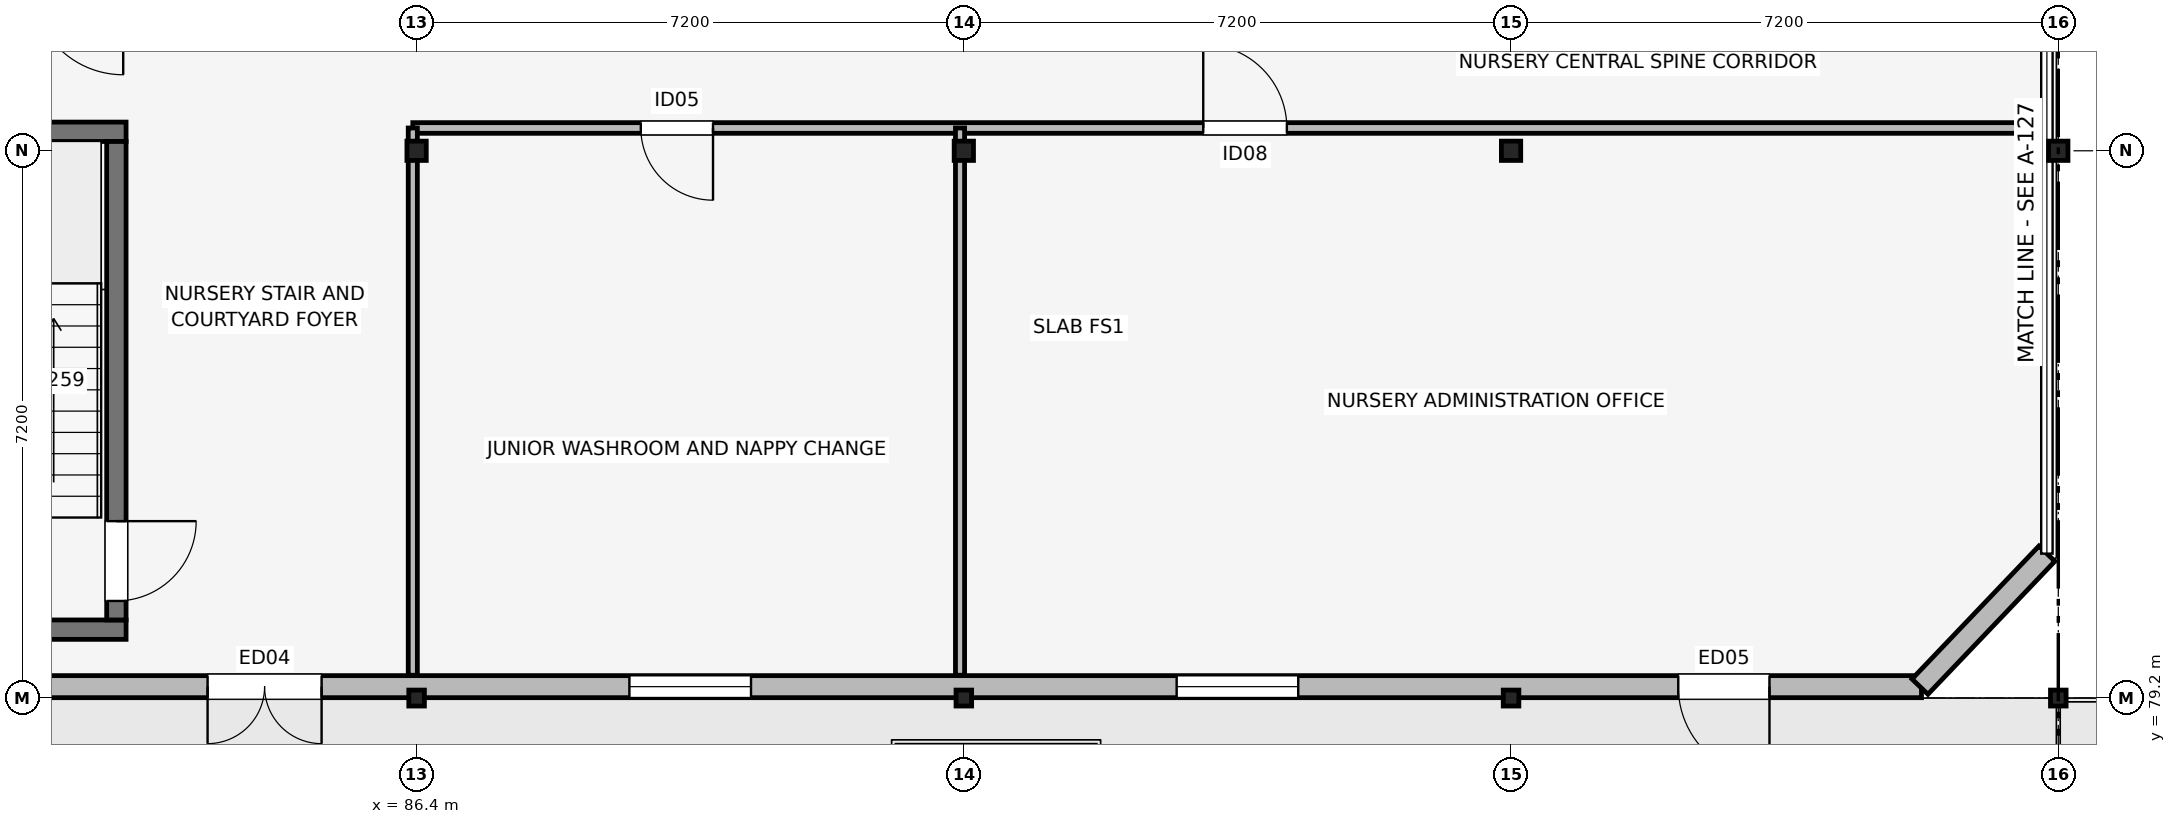
"""IFC4 building model, lengths in metres.
Left out: names, types, materials, properties, quantities, classifications, styles, units other than length and angle.
Written with IfcOpenShell. Run it as: python <this file> out.ifc"""

import sys

from ifc_helpers import new_model, si_unit, direction, frame, frame_2d, origin, origin_2d, place, context, subcontext, project, spatial, rectangle, i_section, extrude, element, fill, save


model = new_model("IFC4")
c1 = context("Model", 3, precision=1e-05, world=origin(), true_north=direction((0.0, 1.0)))
c2 = subcontext(c1, "Body", "Model", "MODEL_VIEW")
j1 = project(units=[si_unit("LENGTHUNIT", "METRE"), si_unit("PLANEANGLEUNIT", "RADIAN")], contexts=[c1])
p1 = place(None, origin())
s1 = spatial("IfcSite", under=j1, at=p1, CompositionType="ELEMENT")
p2 = place(p1, origin())
s2 = spatial("IfcBuilding", under=s1, at=p2, CompositionType="ELEMENT")
p3 = place(p2, frame((0.0, 0.0, 4.5)))
s3 = spatial("IfcBuildingStorey", under=s2, at=p3, CompositionType="ELEMENT", Elevation=4.5)
p4 = place(p3, frame((86.4, 79.2, 0.0), z_axis=(0.0, 0.0, 1.0), x_axis=(1.0, 0.0, 0.0)))
e1 = element("IfcColumn", 1, at=p4, inside=s3, PredefinedType="COLUMN", context=c2, shape_type="SweptSolid", body=[
    extrude(i_section(OverallWidth=0.205, OverallDepth=0.21, WebThickness=0.009, FlangeThickness=0.014, FilletRadius=0.01, at=origin_2d()), origin(), (0.0, 0.0, 1.0), 4.2),
])
p5 = place(p3, frame((86.4, 86.4, 0.0), z_axis=(0.0, 0.0, 1.0), x_axis=(1.0, 0.0, 0.0)))
e2 = element("IfcColumn", 2, at=p5, inside=s3, PredefinedType="COLUMN", context=c2, shape_type="SweptSolid", body=[
    extrude(i_section(OverallWidth=0.254, OverallDepth=0.254, WebThickness=0.009, FlangeThickness=0.014, FilletRadius=0.013, at=origin_2d()), origin(), (0.0, 0.0, 1.0), 4.2),
])
p6 = place(p3, frame((93.6, 79.2, 0.0), z_axis=(0.0, 0.0, 1.0), x_axis=(1.0, 0.0, 0.0)))
e3 = element("IfcColumn", 3, at=p6, inside=s3, PredefinedType="COLUMN", context=c2, shape_type="SweptSolid", body=[
    extrude(i_section(OverallWidth=0.205, OverallDepth=0.21, WebThickness=0.009, FlangeThickness=0.014, FilletRadius=0.01, at=origin_2d()), origin(), (0.0, 0.0, 1.0), 4.2),
])
p7 = place(p3, frame((93.6, 86.4, 0.0), z_axis=(0.0, 0.0, 1.0), x_axis=(1.0, 0.0, 0.0)))
e4 = element("IfcColumn", 4, at=p7, inside=s3, PredefinedType="COLUMN", context=c2, shape_type="SweptSolid", body=[
    extrude(i_section(OverallWidth=0.254, OverallDepth=0.254, WebThickness=0.009, FlangeThickness=0.014, FilletRadius=0.013, at=origin_2d()), origin(), (0.0, 0.0, 1.0), 4.2),
])
p8 = place(p3, frame((100.8, 79.2, 0.0), z_axis=(0.0, 0.0, 1.0), x_axis=(1.0, 0.0, 0.0)))
e5 = element("IfcColumn", 5, at=p8, inside=s3, PredefinedType="COLUMN", context=c2, shape_type="SweptSolid", body=[
    extrude(i_section(OverallWidth=0.205, OverallDepth=0.21, WebThickness=0.009, FlangeThickness=0.014, FilletRadius=0.01, at=origin_2d()), origin(), (0.0, 0.0, 1.0), 4.2),
])
p9 = place(p3, frame((100.8, 86.4, 0.0), z_axis=(0.0, 0.0, 1.0), x_axis=(1.0, 0.0, 0.0)))
e6 = element("IfcColumn", 6, at=p9, inside=s3, PredefinedType="COLUMN", context=c2, shape_type="SweptSolid", body=[
    extrude(i_section(OverallWidth=0.254, OverallDepth=0.254, WebThickness=0.009, FlangeThickness=0.014, FilletRadius=0.013, at=origin_2d()), origin(), (0.0, 0.0, 1.0), 4.2),
])
p10 = place(p3, frame((108.0, 79.2, 0.0), z_axis=(0.0, 0.0, 1.0), x_axis=(1.0, 0.0, 0.0)))
e7 = element("IfcColumn", 7, at=p10, inside=s3, PredefinedType="COLUMN", context=c2, shape_type="SweptSolid", body=[
    extrude(i_section(OverallWidth=0.205, OverallDepth=0.21, WebThickness=0.009, FlangeThickness=0.014, FilletRadius=0.01, at=origin_2d()), origin(), (0.0, 0.0, 1.0), 4.2),
])
p11 = place(p3, frame((108.0, 86.4, 0.0), z_axis=(0.0, 0.0, 1.0), x_axis=(1.0, 0.0, 0.0)))
e8 = element("IfcColumn", 8, at=p11, inside=s3, PredefinedType="COLUMN", context=c2, shape_type="SweptSolid", body=[
    extrude(i_section(OverallWidth=0.254, OverallDepth=0.254, WebThickness=0.009, FlangeThickness=0.014, FilletRadius=0.013, at=origin_2d()), origin(), (0.0, 0.0, 1.0), 4.2),
])
for number, where, z_axis, x_axis in (
    (9, (79.272, 80.1, 0.0), (0.0, 0.0, 1.0), (1.0, 0.0, 0.0)),
    (10, (79.272, 86.65, 0.0), (0.0, 0.0, 1.0), (1.0, 0.0, 0.0)),
):
    element("IfcWall", number, at=place(p3, frame(where, z_axis=z_axis, x_axis=x_axis)), inside=s3, PredefinedType="SHEAR", context=c2, shape_type="SweptSolid", body=[
        extrude(rectangle(XDim=3.305, YDim=0.255, at=frame_2d((1.652, 0.0))), origin(), (0.0, 0.0, 1.0), 4.2),
    ])
p12 = place(p3, frame((82.45, 80.228, 0.0), z_axis=(0.0, 0.0, 1.0), x_axis=(0.0, 1.0, 0.0)))
e11 = element("IfcWall", 11, at=p12, inside=s3, PredefinedType="SHEAR", context=c2, shape_type="SweptSolid", body=[
    extrude(rectangle(XDim=6.295, YDim=0.255, at=frame_2d((3.147, 0.0))), origin(), (0.0, 0.0, 1.0), 4.2),
])
p13 = place(p12, frame((1.3, 0.0, 0.0), z_axis=(0.0, 0.0, 1.0), x_axis=(-1.0, 0.0, 0.0)))
e12 = element("IfcOpeningElement", 12, at=p13, cuts=e11, PredefinedType="OPENING", context=c2, shape_type="SweptSolid", body=[
    extrude(rectangle(XDim=1.05, YDim=2.12, at=frame_2d((0.525, 1.06))), frame((0.0, 0.137, 0.0), z_axis=(0.0, -1.0, 0.0), x_axis=(1.0, 0.0, 0.0)), (0.0, 0.0, 1.0), 0.275),
])
p14 = place(p3, frame((59.4, 79.35, 0.0), z_axis=(0.0, 0.0, 1.0), x_axis=(1.0, 0.0, 0.0)))
e13 = element("IfcWall", 13, at=p14, inside=s3, PredefinedType="SOLIDWALL", context=c2, shape_type="SweptSolid", body=[
    extrude(rectangle(XDim=46.8, YDim=0.29, at=frame_2d((23.4, 0.0))), origin(), (0.0, 0.0, 1.0), 3.448),
])
p15 = place(p14, frame((25.75, 0.0, 0.0), z_axis=(0.0, 0.0, 1.0), x_axis=(-1.0, 0.0, 0.0)))
e14 = element("IfcOpeningElement", 14, at=p15, cuts=e13, PredefinedType="OPENING", context=c2, shape_type="SweptSolid", body=[
    extrude(rectangle(XDim=1.5, YDim=2.35, at=frame_2d((0.75, 1.175))), frame((0.0, 0.155, 0.0), z_axis=(0.0, -1.0, 0.0), x_axis=(1.0, 0.0, 0.0)), (0.0, 0.0, 1.0), 0.31),
])
p16 = place(p14, frame((44.8, 0.0, 0.0), z_axis=(0.0, 0.0, 1.0), x_axis=(-1.0, 0.0, 0.0)))
e15 = element("IfcOpeningElement", 15, at=p16, cuts=e13, PredefinedType="OPENING", context=c2, shape_type="SweptSolid", body=[
    extrude(rectangle(XDim=1.2, YDim=2.2, at=frame_2d((0.6, 1.1))), frame((0.0, 0.155, 0.0), z_axis=(0.0, -1.0, 0.0), x_axis=(1.0, 0.0, 0.0)), (0.0, 0.0, 1.0), 0.31),
])
p17 = place(p14, frame((1.7, 0.0, 1.1)))
e16 = element("IfcOpeningElement", 16, at=p17, cuts=e13, PredefinedType="OPENING", context=c2, shape_type="SweptSolid", body=[
    extrude(rectangle(XDim=1.8, YDim=1.2, at=frame_2d((0.9, 0.6))), frame((0.0, 0.155, 0.0), z_axis=(0.0, -1.0, 0.0), x_axis=(1.0, 0.0, 0.0)), (0.0, 0.0, 1.0), 0.31),
])
p18 = place(p14, frame((10.3, 0.0, 0.75)))
e17 = element("IfcOpeningElement", 17, at=p18, cuts=e13, PredefinedType="OPENING", context=c2, shape_type="SweptSolid", body=[
    extrude(rectangle(XDim=1.6, YDim=2.0, at=frame_2d((0.8, 1.0))), frame((0.0, 0.155, 0.0), z_axis=(0.0, -1.0, 0.0), x_axis=(1.0, 0.0, 0.0)), (0.0, 0.0, 1.0), 0.31),
])
p19 = place(p14, frame((29.8, 0.0, 0.75)))
e18 = element("IfcOpeningElement", 18, at=p19, cuts=e13, PredefinedType="OPENING", context=c2, shape_type="SweptSolid", body=[
    extrude(rectangle(XDim=1.6, YDim=2.0, at=frame_2d((0.8, 1.0))), frame((0.0, 0.155, 0.0), z_axis=(0.0, -1.0, 0.0), x_axis=(1.0, 0.0, 0.0)), (0.0, 0.0, 1.0), 0.31),
])
p20 = place(p14, frame((37.0, 0.0, 0.75)))
e19 = element("IfcOpeningElement", 19, at=p20, cuts=e13, PredefinedType="OPENING", context=c2, shape_type="SweptSolid", body=[
    extrude(rectangle(XDim=1.6, YDim=2.0, at=frame_2d((0.8, 1.0))), frame((0.0, 0.155, 0.0), z_axis=(0.0, -1.0, 0.0), x_axis=(1.0, 0.0, 0.0)), (0.0, 0.0, 1.0), 0.31),
])
p21 = place(p3, frame((106.18, 79.35, 0.0), z_axis=(0.0, 0.0, 1.0), x_axis=(0.690413335594, 0.72341511322, 0.0)))
e20 = element("IfcWall", 20, at=p21, inside=s3, PredefinedType="SOLIDWALL", context=c2, shape_type="SweptSolid", body=[
    extrude(rectangle(XDim=2.419, YDim=0.29, at=frame_2d((1.209, 0.0))), origin(), (0.0, 0.0, 1.0), 3.448),
])
p22 = place(p3, frame((86.35, 86.7, 0.0), z_axis=(0.0, 0.0, 1.0), x_axis=(1.0, 0.0, 0.0)))
e21 = element("IfcWall", 21, at=p22, inside=s3, PredefinedType="PARTITIONING", context=c2, shape_type="SweptSolid", body=[
    extrude(rectangle(XDim=21.51, YDim=0.14, at=frame_2d((10.755, 0.0))), origin(), (0.0, 0.0, 1.0), 3.2),
])
p23 = place(p22, frame((3.95, 0.0, 0.0), z_axis=(0.0, 0.0, 1.0), x_axis=(-1.0, 0.0, 0.0)))
e22 = element("IfcOpeningElement", 22, at=p23, cuts=e21, PredefinedType="OPENING", context=c2, shape_type="SweptSolid", body=[
    extrude(rectangle(XDim=0.95, YDim=2.12, at=frame_2d((0.475, 1.06))), frame((0.0, 0.08, 0.0), z_axis=(0.0, -1.0, 0.0), x_axis=(1.0, 0.0, 0.0)), (0.0, 0.0, 1.0), 0.16),
])
p24 = place(p22, frame((10.4, 0.0, 0.0)))
e23 = element("IfcOpeningElement", 23, at=p24, cuts=e21, PredefinedType="OPENING", context=c2, shape_type="SweptSolid", body=[
    extrude(rectangle(XDim=1.1, YDim=2.15, at=frame_2d((0.55, 1.075))), frame((0.0, 0.08, 0.0), z_axis=(0.0, -1.0, 0.0), x_axis=(1.0, 0.0, 0.0)), (0.0, 0.0, 1.0), 0.16),
])
for number, where, z_axis, x_axis in (
    (24, (86.35, 79.5, 0.0), (0.0, 0.0, 1.0), (0.0, 1.0, 0.0)),
    (25, (93.55, 79.5, 0.0), (0.0, 0.0, 1.0), (0.0, 1.0, 0.0)),
):
    element("IfcWall", number, at=place(p3, frame(where, z_axis=z_axis, x_axis=x_axis)), inside=s3, PredefinedType="PARTITIONING", context=c2, shape_type="SweptSolid", body=[
        extrude(rectangle(XDim=7.2, YDim=0.12, at=frame_2d((3.6, 0.0))), origin(), (0.0, 0.0, 1.0), 3.2),
    ])
p25 = place(p15, origin())
e26 = element("IfcDoor", 26, at=p25, inside=s3, OperationType="DOUBLE_DOOR_SINGLE_SWING", PredefinedType="DOOR", context=c2, shape_type="SweptSolid", body=[
    extrude(rectangle(XDim=1.5, YDim=2.35, at=frame_2d((0.75, 1.175))), frame((0.0, 0.025, 0.0), z_axis=(0.0, -1.0, 0.0), x_axis=(1.0, 0.0, 0.0)), (0.0, 0.0, 1.0), 0.05),
])
fill(e14, e26)
p26 = place(p16, origin())
e27 = element("IfcDoor", 27, at=p26, inside=s3, OperationType="SINGLE_SWING_RIGHT", PredefinedType="DOOR", context=c2, shape_type="SweptSolid", body=[
    extrude(rectangle(XDim=1.2, YDim=2.2, at=frame_2d((0.6, 1.1))), frame((0.0, 0.025, 0.0), z_axis=(0.0, -1.0, 0.0), x_axis=(1.0, 0.0, 0.0)), (0.0, 0.0, 1.0), 0.05),
])
fill(e15, e27)
p27 = place(p19, origin())
e28 = element("IfcWindow", 28, at=p27, inside=s3, PartitioningType="SINGLE_PANEL", PredefinedType="WINDOW", context=c2, shape_type="SweptSolid", body=[
    extrude(rectangle(XDim=1.6, YDim=2.0, at=frame_2d((0.8, 1.0))), frame((0.0, 0.03, 0.0), z_axis=(0.0, -1.0, 0.0), x_axis=(1.0, 0.0, 0.0)), (0.0, 0.0, 1.0), 0.06),
])
fill(e18, e28)
p28 = place(p20, origin())
e29 = element("IfcWindow", 29, at=p28, inside=s3, PartitioningType="SINGLE_PANEL", PredefinedType="WINDOW", context=c2, shape_type="SweptSolid", body=[
    extrude(rectangle(XDim=1.6, YDim=2.0, at=frame_2d((0.8, 1.0))), frame((0.0, 0.03, 0.0), z_axis=(0.0, -1.0, 0.0), x_axis=(1.0, 0.0, 0.0)), (0.0, 0.0, 1.0), 0.06),
])
fill(e19, e29)
p29 = place(p23, origin())
e30 = element("IfcDoor", 30, at=p29, inside=s3, OperationType="SINGLE_SWING_RIGHT", PredefinedType="DOOR", context=c2, shape_type="SweptSolid", body=[
    extrude(rectangle(XDim=0.95, YDim=2.12, at=frame_2d((0.475, 1.06))), frame((0.0, 0.025, 0.0), z_axis=(0.0, -1.0, 0.0), x_axis=(1.0, 0.0, 0.0)), (0.0, 0.0, 1.0), 0.05),
])
fill(e22, e30)
p30 = place(p24, origin())
e31 = element("IfcDoor", 31, at=p30, inside=s3, OperationType="SINGLE_SWING_LEFT", PredefinedType="DOOR", context=c2, shape_type="SweptSolid", body=[
    extrude(rectangle(XDim=1.1, YDim=2.15, at=frame_2d((0.55, 1.075))), frame((0.0, 0.025, 0.0), z_axis=(0.0, -1.0, 0.0), x_axis=(1.0, 0.0, 0.0)), (0.0, 0.0, 1.0), 0.05),
])
fill(e23, e31)
p31 = place(p13, origin())
e32 = element("IfcDoor", 32, at=p31, inside=s3, OperationType="SINGLE_SWING_RIGHT", PredefinedType="DOOR", context=c2, shape_type="SweptSolid", body=[
    extrude(rectangle(XDim=1.05, YDim=2.12, at=frame_2d((0.525, 1.06))), frame((0.0, 0.025, 0.0), z_axis=(0.0, -1.0, 0.0), x_axis=(1.0, 0.0, 0.0)), (0.0, 0.0, 1.0), 0.05),
])
fill(e12, e32)
save(model, sys.argv[1])
